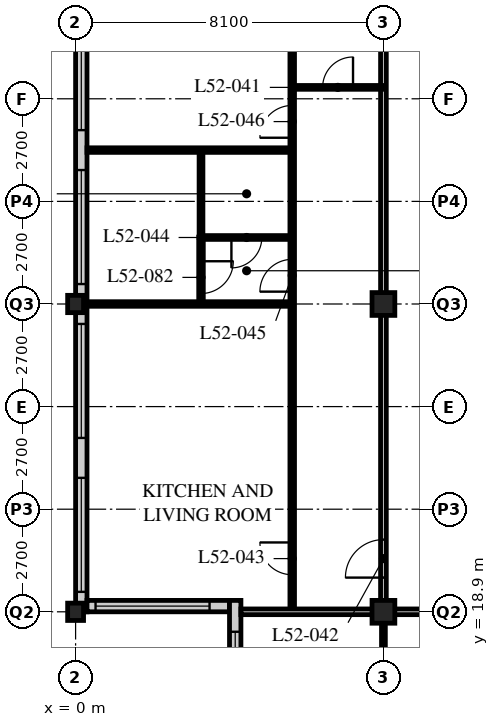
"""IFC4 building model, lengths in metres.
Left out: names, types, materials, properties, quantities, classifications, styles, units other than length and angle.
Written with IfcOpenShell. Run it as: python <this file> out.ifc"""

import sys

from ifc_helpers import new_model, si_unit, direction, frame, frame_2d, origin, origin_2d, place, context, subcontext, project, spatial, rectangle, hollow_rectangle, i_section, extrude, element, fill, save


model = new_model("IFC4")
c1 = context("Model", 3, precision=1e-05, world=origin(), true_north=direction((0.0, 1.0)))
c2 = subcontext(c1, "Body", "Model", "MODEL_VIEW")
j1 = project(units=[si_unit("LENGTHUNIT", "METRE"), si_unit("PLANEANGLEUNIT", "RADIAN")], contexts=[c1])
p1 = place(None, origin())
s1 = spatial("IfcSite", under=j1, at=p1, CompositionType="ELEMENT")
p2 = place(p1, origin())
s2 = spatial("IfcBuilding", under=s1, at=p2, CompositionType="ELEMENT")
p3 = place(p2, frame((0.0, 0.0, 202.8)))
s3 = spatial("IfcBuildingStorey", under=s2, at=p3, CompositionType="ELEMENT", Elevation=202.8)
for number, where, z_axis, x_axis in (
    (1, (0.0, 18.9, 0.0), (0.0, 0.0, 1.0), (1.0, 0.0, 0.0)),
    (2, (0.0, 27.0, 0.0), (0.0, 0.0, 1.0), (1.0, 0.0, 0.0)),
):
    element("IfcColumn", number, at=place(p3, frame(where, z_axis=z_axis, x_axis=x_axis)), inside=s3, PredefinedType="COLUMN", context=c2, shape_type="SweptSolid", body=[
        extrude(i_section(OverallWidth=0.418, OverallDepth=0.456, WebThickness=0.042, FlangeThickness=0.067, FilletRadius=0.015, at=origin_2d()), origin(), (0.0, 0.0, 1.0), 3.6),
    ])
for number, where, z_axis, x_axis in (
    (3, (8.1, 18.9, 0.0), (0.0, 0.0, 1.0), (1.0, 0.0, 0.0)),
    (4, (8.1, 27.0, 0.0), (0.0, 0.0, 1.0), (1.0, 0.0, 0.0)),
):
    element("IfcColumn", number, at=place(p3, frame(where, z_axis=z_axis, x_axis=x_axis)), inside=s3, PredefinedType="COLUMN", context=c2, shape_type="SweptSolid", body=[
        extrude(hollow_rectangle(XDim=0.6, YDim=0.6, WallThickness=0.05, at=origin_2d()), origin(), (0.0, 0.0, 1.0), 3.6),
    ])
p4 = place(p3, frame((0.15, 51.0, 0.0), z_axis=(0.0, 0.0, 1.0), x_axis=(0.0, -1.0, 0.0)))
e5 = element("IfcWall", 5, at=p4, inside=s3, PredefinedType="SOLIDWALL", context=c2, shape_type="SweptSolid", body=[
    extrude(rectangle(XDim=32.1, YDim=0.3, at=frame_2d((16.05, 0.0))), origin(), (0.0, 0.0, 1.0), 3.39),
])
p5 = place(p4, frame((0.225, 0.0, 0.6)))
e6 = element("IfcOpeningElement", 6, at=p5, cuts=e5, PredefinedType="OPENING", context=c2, shape_type="SweptSolid", body=[
    extrude(rectangle(XDim=3.0, YDim=2.4, at=frame_2d((1.5, 1.2))), frame((0.0, 0.16, 0.0), z_axis=(0.0, -1.0, 0.0), x_axis=(1.0, 0.0, 0.0)), (0.0, 0.0, 1.0), 0.32),
])
p6 = place(p4, frame((4.275, 0.0, 0.6)))
e7 = element("IfcOpeningElement", 7, at=p6, cuts=e5, PredefinedType="OPENING", context=c2, shape_type="SweptSolid", body=[
    extrude(rectangle(XDim=3.0, YDim=2.4, at=frame_2d((1.5, 1.2))), frame((0.0, 0.16, 0.0), z_axis=(0.0, -1.0, 0.0), x_axis=(1.0, 0.0, 0.0)), (0.0, 0.0, 1.0), 0.32),
])
p7 = place(p4, frame((8.325, 0.0, 0.6)))
e8 = element("IfcOpeningElement", 8, at=p7, cuts=e5, PredefinedType="OPENING", context=c2, shape_type="SweptSolid", body=[
    extrude(rectangle(XDim=3.0, YDim=2.4, at=frame_2d((1.5, 1.2))), frame((0.0, 0.16, 0.0), z_axis=(0.0, -1.0, 0.0), x_axis=(1.0, 0.0, 0.0)), (0.0, 0.0, 1.0), 0.32),
])
p8 = place(p4, frame((12.375, 0.0, 0.6)))
e9 = element("IfcOpeningElement", 9, at=p8, cuts=e5, PredefinedType="OPENING", context=c2, shape_type="SweptSolid", body=[
    extrude(rectangle(XDim=3.0, YDim=2.4, at=frame_2d((1.5, 1.2))), frame((0.0, 0.16, 0.0), z_axis=(0.0, -1.0, 0.0), x_axis=(1.0, 0.0, 0.0)), (0.0, 0.0, 1.0), 0.32),
])
p9 = place(p4, frame((16.425, 0.0, 0.6)))
e10 = element("IfcOpeningElement", 10, at=p9, cuts=e5, PredefinedType="OPENING", context=c2, shape_type="SweptSolid", body=[
    extrude(rectangle(XDim=3.0, YDim=2.4, at=frame_2d((1.5, 1.2))), frame((0.0, 0.16, 0.0), z_axis=(0.0, -1.0, 0.0), x_axis=(1.0, 0.0, 0.0)), (0.0, 0.0, 1.0), 0.32),
])
p10 = place(p4, frame((20.475, 0.0, 0.6)))
e11 = element("IfcOpeningElement", 11, at=p10, cuts=e5, PredefinedType="OPENING", context=c2, shape_type="SweptSolid", body=[
    extrude(rectangle(XDim=3.0, YDim=2.4, at=frame_2d((1.5, 1.2))), frame((0.0, 0.16, 0.0), z_axis=(0.0, -1.0, 0.0), x_axis=(1.0, 0.0, 0.0)), (0.0, 0.0, 1.0), 0.32),
])
p11 = place(p4, frame((24.525, 0.0, 0.6)))
e12 = element("IfcOpeningElement", 12, at=p11, cuts=e5, PredefinedType="OPENING", context=c2, shape_type="SweptSolid", body=[
    extrude(rectangle(XDim=3.0, YDim=2.4, at=frame_2d((1.5, 1.2))), frame((0.0, 0.16, 0.0), z_axis=(0.0, -1.0, 0.0), x_axis=(1.0, 0.0, 0.0)), (0.0, 0.0, 1.0), 0.32),
])
p12 = place(p4, frame((28.575, 0.0, 0.6)))
e13 = element("IfcOpeningElement", 13, at=p12, cuts=e5, PredefinedType="OPENING", context=c2, shape_type="SweptSolid", body=[
    extrude(rectangle(XDim=3.0, YDim=2.4, at=frame_2d((1.5, 1.2))), frame((0.0, 0.16, 0.0), z_axis=(0.0, -1.0, 0.0), x_axis=(1.0, 0.0, 0.0)), (0.0, 0.0, 1.0), 0.32),
])
p13 = place(p3, frame((0.3, 19.05, 0.0), z_axis=(0.0, 0.0, 1.0), x_axis=(1.0, 0.0, 0.0)))
e14 = element("IfcWall", 14, at=p13, inside=s3, PredefinedType="SOLIDWALL", context=c2, shape_type="SweptSolid", body=[
    extrude(rectangle(XDim=3.75, YDim=0.3, at=frame_2d((1.875, 0.0))), origin(), (0.0, 0.0, 1.0), 3.39),
])
p14 = place(p13, frame((0.225, 0.0, 0.6)))
e15 = element("IfcOpeningElement", 15, at=p14, cuts=e14, PredefinedType="OPENING", context=c2, shape_type="SweptSolid", body=[
    extrude(rectangle(XDim=3.0, YDim=2.0, at=frame_2d((1.5, 1.0))), frame((0.0, 0.16, 0.0), z_axis=(0.0, -1.0, 0.0), x_axis=(1.0, 0.0, 0.0)), (0.0, 0.0, 1.0), 0.32),
])
p15 = place(p3, frame((4.2, 19.2, 0.0), z_axis=(0.0, 0.0, 1.0), x_axis=(0.0, -1.0, 0.0)))
e16 = element("IfcWall", 16, at=p15, inside=s3, PredefinedType="SOLIDWALL", context=c2, shape_type="SweptSolid", body=[
    extrude(rectangle(XDim=4.35, YDim=0.3, at=frame_2d((2.175, 0.0))), origin(), (0.0, 0.0, 1.0), 3.39),
])
p16 = place(p15, frame((0.825, 0.0, 0.6)))
e17 = element("IfcOpeningElement", 17, at=p16, cuts=e16, PredefinedType="OPENING", context=c2, shape_type="SweptSolid", body=[
    extrude(rectangle(XDim=3.0, YDim=2.0, at=frame_2d((1.5, 1.0))), frame((0.0, 0.16, 0.0), z_axis=(0.0, -1.0, 0.0), x_axis=(1.0, 0.0, 0.0)), (0.0, 0.0, 1.0), 0.32),
])
p17 = place(p3, frame((8.1, 18.9, 0.0), z_axis=(0.0, 0.0, 1.0), x_axis=(1.0, 0.0, 0.0)))
e18 = element("IfcWall", 18, at=p17, inside=s3, PredefinedType="PARTITIONING", context=c2, shape_type="SweptSolid", body=[
    extrude(rectangle(XDim=36.45, YDim=0.15, at=frame_2d((18.225, 0.0))), origin(), (0.0, 0.0, 1.0), 2.778),
])
p18 = place(p17, frame((4.45, 0.0, 0.0)))
e19 = element("IfcOpeningElement", 19, at=p18, cuts=e18, PredefinedType="OPENING", context=c2, shape_type="SweptSolid", body=[
    extrude(rectangle(XDim=1.0, YDim=2.1, at=frame_2d((0.5, 1.05))), frame((0.0, 0.085, 0.0), z_axis=(0.0, -1.0, 0.0), x_axis=(1.0, 0.0, 0.0)), (0.0, 0.0, 1.0), 0.17),
])
p19 = place(p17, frame((12.55, 0.0, 0.0)))
e20 = element("IfcOpeningElement", 20, at=p19, cuts=e18, PredefinedType="OPENING", context=c2, shape_type="SweptSolid", body=[
    extrude(rectangle(XDim=1.0, YDim=2.1, at=frame_2d((0.5, 1.05))), frame((0.0, 0.085, 0.0), z_axis=(0.0, -1.0, 0.0), x_axis=(1.0, 0.0, 0.0)), (0.0, 0.0, 1.0), 0.17),
])
p20 = place(p17, frame((29.05, 0.0, 0.0)))
e21 = element("IfcOpeningElement", 21, at=p20, cuts=e18, PredefinedType="OPENING", context=c2, shape_type="SweptSolid", body=[
    extrude(rectangle(XDim=1.0, YDim=2.1, at=frame_2d((0.5, 1.05))), frame((0.0, 0.085, 0.0), z_axis=(0.0, -1.0, 0.0), x_axis=(1.0, 0.0, 0.0)), (0.0, 0.0, 1.0), 0.17),
])
p21 = place(p17, frame((2.625, 0.0, 0.0)))
e22 = element("IfcOpeningElement", 22, at=p21, cuts=e18, PredefinedType="OPENING", context=c2, shape_type="SweptSolid", body=[
    extrude(rectangle(XDim=1.0, YDim=2.1, at=frame_2d((0.5, 1.05))), frame((0.0, 0.085, 0.0), z_axis=(0.0, -1.0, 0.0), x_axis=(1.0, 0.0, 0.0)), (0.0, 0.0, 1.0), 0.17),
])
p22 = place(p17, frame((33.925, 0.0, 0.0)))
e23 = element("IfcOpeningElement", 23, at=p22, cuts=e18, PredefinedType="OPENING", context=c2, shape_type="SweptSolid", body=[
    extrude(rectangle(XDim=1.0, YDim=2.1, at=frame_2d((0.5, 1.05))), frame((0.0, 0.085, 0.0), z_axis=(0.0, -1.0, 0.0), x_axis=(1.0, 0.0, 0.0)), (0.0, 0.0, 1.0), 0.17),
])
p23 = place(p3, frame((8.1, 18.9, 0.0), z_axis=(0.0, 0.0, 1.0), x_axis=(0.0, 1.0, 0.0)))
e24 = element("IfcWall", 24, at=p23, inside=s3, PredefinedType="PARTITIONING", context=c2, shape_type="SweptSolid", body=[
    extrude(rectangle(XDim=28.35, YDim=0.15, at=frame_2d((14.175, 0.0))), origin(), (0.0, 0.0, 1.0), 2.778),
])
p24 = place(p23, frame((0.9, 0.0, 0.0)))
e25 = element("IfcOpeningElement", 25, at=p24, cuts=e24, PredefinedType="OPENING", context=c2, shape_type="SweptSolid", body=[
    extrude(rectangle(XDim=1.0, YDim=2.1, at=frame_2d((0.5, 1.05))), frame((0.0, 0.085, 0.0), z_axis=(0.0, -1.0, 0.0), x_axis=(1.0, 0.0, 0.0)), (0.0, 0.0, 1.0), 0.17),
])
p25 = place(p23, frame((17.1, 0.0, 0.0)))
e26 = element("IfcOpeningElement", 26, at=p25, cuts=e24, PredefinedType="OPENING", context=c2, shape_type="SweptSolid", body=[
    extrude(rectangle(XDim=1.0, YDim=2.1, at=frame_2d((0.5, 1.05))), frame((0.0, 0.085, 0.0), z_axis=(0.0, -1.0, 0.0), x_axis=(1.0, 0.0, 0.0)), (0.0, 0.0, 1.0), 0.17),
])
p26 = place(p23, frame((26.65, 0.0, 0.0)))
e27 = element("IfcOpeningElement", 27, at=p26, cuts=e24, PredefinedType="OPENING", context=c2, shape_type="SweptSolid", body=[
    extrude(rectangle(XDim=1.0, YDim=2.1, at=frame_2d((0.5, 1.05))), frame((0.0, 0.085, 0.0), z_axis=(0.0, -1.0, 0.0), x_axis=(1.0, 0.0, 0.0)), (0.0, 0.0, 1.0), 0.17),
])
p27 = place(p3, frame((5.7, 18.9, 0.0), z_axis=(0.0, 0.0, 1.0), x_axis=(0.0, 1.0, 0.0)))
e28 = element("IfcWall", 28, at=p27, inside=s3, PredefinedType="PARTITIONING", context=c2, shape_type="SweptSolid", body=[
    extrude(rectangle(XDim=24.3, YDim=0.12, at=frame_2d((12.15, 0.0))), origin(), (0.0, 0.0, 1.0), 3.39),
])
p28 = place(p27, frame((0.975, 0.0, 0.0)))
e29 = element("IfcOpeningElement", 29, at=p28, cuts=e28, PredefinedType="OPENING", context=c2, shape_type="SweptSolid", body=[
    extrude(rectangle(XDim=0.85, YDim=2.1, at=frame_2d((0.425, 1.05))), frame((0.0, 0.07, 0.0), z_axis=(0.0, -1.0, 0.0), x_axis=(1.0, 0.0, 0.0)), (0.0, 0.0, 1.0), 0.14),
])
p29 = place(p27, frame((8.425, 0.0, 0.0)))
e30 = element("IfcOpeningElement", 30, at=p29, cuts=e28, PredefinedType="OPENING", context=c2, shape_type="SweptSolid", body=[
    extrude(rectangle(XDim=0.85, YDim=2.1, at=frame_2d((0.425, 1.05))), frame((0.0, 0.07, 0.0), z_axis=(0.0, -1.0, 0.0), x_axis=(1.0, 0.0, 0.0)), (0.0, 0.0, 1.0), 0.14),
])
p30 = place(p27, frame((12.475, 0.0, 0.0)))
e31 = element("IfcOpeningElement", 31, at=p30, cuts=e28, PredefinedType="OPENING", context=c2, shape_type="SweptSolid", body=[
    extrude(rectangle(XDim=0.85, YDim=2.1, at=frame_2d((0.425, 1.05))), frame((0.0, 0.07, 0.0), z_axis=(0.0, -1.0, 0.0), x_axis=(1.0, 0.0, 0.0)), (0.0, 0.0, 1.0), 0.14),
])
p31 = place(p27, frame((17.175, 0.0, 0.0)))
e32 = element("IfcOpeningElement", 32, at=p31, cuts=e28, PredefinedType="OPENING", context=c2, shape_type="SweptSolid", body=[
    extrude(rectangle(XDim=0.85, YDim=2.1, at=frame_2d((0.425, 1.05))), frame((0.0, 0.07, 0.0), z_axis=(0.0, -1.0, 0.0), x_axis=(1.0, 0.0, 0.0)), (0.0, 0.0, 1.0), 0.14),
])
p32 = place(p27, frame((20.575, 0.0, 0.0)))
e33 = element("IfcOpeningElement", 33, at=p32, cuts=e28, PredefinedType="OPENING", context=c2, shape_type="SweptSolid", body=[
    extrude(rectangle(XDim=0.85, YDim=2.1, at=frame_2d((0.425, 1.05))), frame((0.0, 0.07, 0.0), z_axis=(0.0, -1.0, 0.0), x_axis=(1.0, 0.0, 0.0)), (0.0, 0.0, 1.0), 0.14),
])
p33 = place(p3, frame((8.1, 32.7, 0.0), z_axis=(0.0, 0.0, 1.0), x_axis=(-1.0, 0.0, 0.0)))
e34 = element("IfcWall", 34, at=p33, inside=s3, PredefinedType="PARTITIONING", context=c2, shape_type="SweptSolid", body=[
    extrude(rectangle(XDim=2.4, YDim=0.1, at=frame_2d((1.2, 0.0))), origin(), (0.0, 0.0, 1.0), 3.39),
])
p34 = place(p33, frame((0.8, 0.0, 0.0)))
e35 = element("IfcOpeningElement", 35, at=p34, cuts=e34, PredefinedType="OPENING", context=c2, shape_type="SweptSolid", body=[
    extrude(rectangle(XDim=0.8, YDim=2.1, at=frame_2d((0.4, 1.05))), frame((0.0, 0.06, 0.0), z_axis=(0.0, -1.0, 0.0), x_axis=(1.0, 0.0, 0.0)), (0.0, 0.0, 1.0), 0.12),
])
p35 = place(p3, frame((5.7, 28.75, 0.0), z_axis=(0.0, 0.0, 1.0), x_axis=(-1.0, 0.0, 0.0)))
e36 = element("IfcWall", 36, at=p35, inside=s3, PredefinedType="PARTITIONING", context=c2, shape_type="SweptSolid", body=[
    extrude(rectangle(XDim=2.4, YDim=0.1, at=frame_2d((1.2, 0.0))), origin(), (0.0, 0.0, 1.0), 3.39),
])
p36 = place(p35, frame((0.8, 0.0, 0.0)))
e37 = element("IfcOpeningElement", 37, at=p36, cuts=e36, PredefinedType="OPENING", context=c2, shape_type="SweptSolid", body=[
    extrude(rectangle(XDim=0.8, YDim=2.1, at=frame_2d((0.4, 1.05))), frame((0.0, 0.06, 0.0), z_axis=(0.0, -1.0, 0.0), x_axis=(1.0, 0.0, 0.0)), (0.0, 0.0, 1.0), 0.12),
])
p37 = place(p3, frame((3.3, 28.75, 0.0), z_axis=(0.0, 0.0, 1.0), x_axis=(0.0, 1.0, 0.0)))
e38 = element("IfcWall", 38, at=p37, inside=s3, PredefinedType="PARTITIONING", context=c2, shape_type="SweptSolid", body=[
    extrude(rectangle(XDim=2.3, YDim=0.1, at=frame_2d((1.15, 0.0))), origin(), (0.0, 0.0, 1.0), 3.39),
])
p38 = place(p3, frame((5.7, 27.0, 0.0), z_axis=(0.0, 0.0, 1.0), x_axis=(-1.0, 0.0, 0.0)))
e39 = element("IfcWall", 39, at=p38, inside=s3, PredefinedType="PARTITIONING", context=c2, shape_type="SweptSolid", body=[
    extrude(rectangle(XDim=5.4, YDim=0.12, at=frame_2d((2.7, 0.0))), origin(), (0.0, 0.0, 1.0), 2.778),
])
p39 = place(p3, frame((5.7, 31.05, 0.0), z_axis=(0.0, 0.0, 1.0), x_axis=(-1.0, 0.0, 0.0)))
e40 = element("IfcWall", 40, at=p39, inside=s3, PredefinedType="PARTITIONING", context=c2, shape_type="SweptSolid", body=[
    extrude(rectangle(XDim=5.4, YDim=0.12, at=frame_2d((2.7, 0.0))), origin(), (0.0, 0.0, 1.0), 3.39),
])
p40 = place(p3, frame((8.1, 18.9, 0.0), z_axis=(0.0, 0.0, 1.0), x_axis=(0.0, -1.0, 0.0)))
e41 = element("IfcWall", 41, at=p40, inside=s3, PredefinedType="PARTITIONING", context=c2, shape_type="SweptSolid", body=[
    extrude(rectangle(XDim=2.4, YDim=0.1, at=frame_2d((1.2, 0.0))), origin(), (0.0, 0.0, 1.0), 2.778),
])
p41 = place(p3, frame((4.35, 18.9, 0.0), z_axis=(0.0, 0.0, 1.0), x_axis=(1.0, 0.0, 0.0)))
e42 = element("IfcWall", 42, at=p41, inside=s3, PredefinedType="PARTITIONING", context=c2, shape_type="SweptSolid", body=[
    extrude(rectangle(XDim=3.75, YDim=0.15, at=frame_2d((1.875, 0.0))), origin(), (0.0, 0.0, 1.0), 2.778),
])
p42 = place(p3, frame((3.3, 27.0, 0.0), z_axis=(0.0, 0.0, 1.0), x_axis=(0.0, 1.0, 0.0)))
e43 = element("IfcWall", 43, at=p42, inside=s3, PredefinedType="PARTITIONING", context=c2, shape_type="SweptSolid", body=[
    extrude(rectangle(XDim=1.76, YDim=0.12, at=frame_2d((0.88, 0.0))), origin(), (0.0, 0.0, 1.0), 3.39),
])
p43 = place(p42, frame((0.275, 0.0, 0.0)))
e44 = element("IfcOpeningElement", 44, at=p43, cuts=e43, PredefinedType="OPENING", context=c2, shape_type="SweptSolid", body=[
    extrude(rectangle(XDim=0.85, YDim=2.1, at=frame_2d((0.425, 1.05))), frame((0.0, 0.07, 0.0), z_axis=(0.0, -1.0, 0.0), x_axis=(1.0, 0.0, 0.0)), (0.0, 0.0, 1.0), 0.14),
])
p44 = place(p9, origin())
e45 = element("IfcWindow", 45, at=p44, inside=s3, PartitioningType="SINGLE_PANEL", PredefinedType="WINDOW", context=c2, shape_type="SweptSolid", body=[
    extrude(rectangle(XDim=3.0, YDim=2.4, at=frame_2d((1.5, 1.2))), frame((0.0, 0.03, 0.0), z_axis=(0.0, -1.0, 0.0), x_axis=(1.0, 0.0, 0.0)), (0.0, 0.0, 1.0), 0.06),
])
fill(e10, e45)
p45 = place(p10, origin())
e46 = element("IfcWindow", 46, at=p45, inside=s3, PartitioningType="SINGLE_PANEL", PredefinedType="WINDOW", context=c2, shape_type="SweptSolid", body=[
    extrude(rectangle(XDim=3.0, YDim=2.4, at=frame_2d((1.5, 1.2))), frame((0.0, 0.03, 0.0), z_axis=(0.0, -1.0, 0.0), x_axis=(1.0, 0.0, 0.0)), (0.0, 0.0, 1.0), 0.06),
])
fill(e11, e46)
p46 = place(p11, origin())
e47 = element("IfcWindow", 47, at=p46, inside=s3, PartitioningType="SINGLE_PANEL", PredefinedType="WINDOW", context=c2, shape_type="SweptSolid", body=[
    extrude(rectangle(XDim=3.0, YDim=2.4, at=frame_2d((1.5, 1.2))), frame((0.0, 0.03, 0.0), z_axis=(0.0, -1.0, 0.0), x_axis=(1.0, 0.0, 0.0)), (0.0, 0.0, 1.0), 0.06),
])
fill(e12, e47)
p47 = place(p12, origin())
e48 = element("IfcWindow", 48, at=p47, inside=s3, PartitioningType="SINGLE_PANEL", PredefinedType="WINDOW", context=c2, shape_type="SweptSolid", body=[
    extrude(rectangle(XDim=3.0, YDim=2.4, at=frame_2d((1.5, 1.2))), frame((0.0, 0.03, 0.0), z_axis=(0.0, -1.0, 0.0), x_axis=(1.0, 0.0, 0.0)), (0.0, 0.0, 1.0), 0.06),
])
fill(e13, e48)
p48 = place(p14, origin())
e49 = element("IfcWindow", 49, at=p48, inside=s3, PartitioningType="SINGLE_PANEL", PredefinedType="WINDOW", context=c2, shape_type="SweptSolid", body=[
    extrude(rectangle(XDim=3.0, YDim=2.0, at=frame_2d((1.5, 1.0))), frame((0.0, 0.03, 0.0), z_axis=(0.0, -1.0, 0.0), x_axis=(1.0, 0.0, 0.0)), (0.0, 0.0, 1.0), 0.06),
])
fill(e15, e49)
p49 = place(p16, origin())
e50 = element("IfcWindow", 50, at=p49, inside=s3, PartitioningType="SINGLE_PANEL", PredefinedType="WINDOW", context=c2, shape_type="SweptSolid", body=[
    extrude(rectangle(XDim=3.0, YDim=2.0, at=frame_2d((1.5, 1.0))), frame((0.0, 0.03, 0.0), z_axis=(0.0, -1.0, 0.0), x_axis=(1.0, 0.0, 0.0)), (0.0, 0.0, 1.0), 0.06),
])
fill(e17, e50)
p50 = place(p34, origin())
e51 = element("IfcDoor", 51, at=p50, inside=s3, OperationType="SINGLE_SWING_RIGHT", PredefinedType="DOOR", context=c2, shape_type="SweptSolid", body=[
    extrude(rectangle(XDim=0.8, YDim=2.1, at=frame_2d((0.4, 1.05))), frame((0.0, 0.025, 0.0), z_axis=(0.0, -1.0, 0.0), x_axis=(1.0, 0.0, 0.0)), (0.0, 0.0, 1.0), 0.05),
])
fill(e35, e51)
p51 = place(p24, origin())
e52 = element("IfcDoor", 52, at=p51, inside=s3, OperationType="SINGLE_SWING_LEFT", PredefinedType="DOOR", context=c2, shape_type="SweptSolid", body=[
    extrude(rectangle(XDim=1.0, YDim=2.1, at=frame_2d((0.5, 1.05))), frame((0.0, 0.025, 0.0), z_axis=(0.0, -1.0, 0.0), x_axis=(1.0, 0.0, 0.0)), (0.0, 0.0, 1.0), 0.05),
])
fill(e25, e52)
p52 = place(p28, origin())
e53 = element("IfcDoor", 53, at=p52, inside=s3, OperationType="SINGLE_SWING_RIGHT", PredefinedType="DOOR", context=c2, shape_type="SweptSolid", body=[
    extrude(rectangle(XDim=0.85, YDim=2.1, at=frame_2d((0.425, 1.05))), frame((0.0, 0.025, 0.0), z_axis=(0.0, -1.0, 0.0), x_axis=(1.0, 0.0, 0.0)), (0.0, 0.0, 1.0), 0.05),
])
fill(e29, e53)
p53 = place(p36, origin())
e54 = element("IfcDoor", 54, at=p53, inside=s3, OperationType="SINGLE_SWING_RIGHT", PredefinedType="DOOR", context=c2, shape_type="SweptSolid", body=[
    extrude(rectangle(XDim=0.8, YDim=2.1, at=frame_2d((0.4, 1.05))), frame((0.0, 0.025, 0.0), z_axis=(0.0, -1.0, 0.0), x_axis=(1.0, 0.0, 0.0)), (0.0, 0.0, 1.0), 0.05),
])
fill(e37, e54)
p54 = place(p29, origin())
e55 = element("IfcDoor", 55, at=p54, inside=s3, OperationType="SINGLE_SWING_LEFT", PredefinedType="DOOR", context=c2, shape_type="SweptSolid", body=[
    extrude(rectangle(XDim=0.85, YDim=2.1, at=frame_2d((0.425, 1.05))), frame((0.0, 0.025, 0.0), z_axis=(0.0, -1.0, 0.0), x_axis=(1.0, 0.0, 0.0)), (0.0, 0.0, 1.0), 0.05),
])
fill(e30, e55)
p55 = place(p30, origin())
e56 = element("IfcDoor", 56, at=p55, inside=s3, OperationType="SINGLE_SWING_LEFT", PredefinedType="DOOR", context=c2, shape_type="SweptSolid", body=[
    extrude(rectangle(XDim=0.85, YDim=2.1, at=frame_2d((0.425, 1.05))), frame((0.0, 0.025, 0.0), z_axis=(0.0, -1.0, 0.0), x_axis=(1.0, 0.0, 0.0)), (0.0, 0.0, 1.0), 0.05),
])
fill(e31, e56)
p56 = place(p43, origin())
e57 = element("IfcDoor", 57, at=p56, inside=s3, OperationType="SINGLE_SWING_LEFT", PredefinedType="DOOR", context=c2, shape_type="SweptSolid", body=[
    extrude(rectangle(XDim=0.85, YDim=2.1, at=frame_2d((0.425, 1.05))), frame((0.0, 0.025, 0.0), z_axis=(0.0, -1.0, 0.0), x_axis=(1.0, 0.0, 0.0)), (0.0, 0.0, 1.0), 0.05),
])
fill(e44, e57)
save(model, sys.argv[1])
